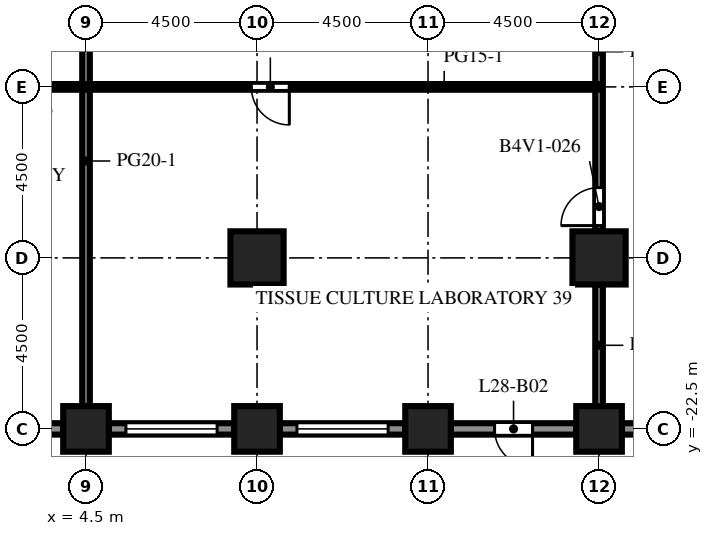
"""IFC4 building model, lengths in metres.
Left out: names, types, materials, properties, quantities, classifications, styles, units other than length and angle.
Written with IfcOpenShell. Run it as: python <this file> out.ifc"""

import sys

from ifc_helpers import new_model, si_unit, direction, frame, frame_2d, origin, origin_2d, place, context, subcontext, project, spatial, rectangle, extrude, element, fill, save


model = new_model("IFC4")
c1 = context("Model", 3, precision=1e-05, world=origin(), true_north=direction((0.0, 1.0)))
c2 = subcontext(c1, "Body", "Model", "MODEL_VIEW")
j1 = project(units=[si_unit("LENGTHUNIT", "METRE"), si_unit("PLANEANGLEUNIT", "RADIAN")], contexts=[c1])
p1 = place(None, origin())
s1 = spatial("IfcSite", under=j1, at=p1, CompositionType="ELEMENT")
p2 = place(p1, origin())
s2 = spatial("IfcBuilding", under=s1, at=p2, CompositionType="ELEMENT")
p3 = place(p2, frame((0.0, 0.0, 124.9)))
s3 = spatial("IfcBuildingStorey", under=s2, at=p3, CompositionType="ELEMENT", Elevation=124.9)
for number, where, z_axis, x_axis in (
    (1, (4.5, -22.5, 0.0), (0.0, 0.0, 1.0), (1.0, 0.0, 0.0)),
    (2, (9.0, -22.5, 0.0), (0.0, 0.0, 1.0), (1.0, 0.0, 0.0)),
    (3, (13.5, -22.5, 0.0), (0.0, 0.0, 1.0), (1.0, 0.0, 0.0)),
    (4, (18.0, -22.5, 0.0), (0.0, 0.0, 1.0), (1.0, 0.0, 0.0)),
):
    element("IfcColumn", number, at=place(p3, frame(where, z_axis=z_axis, x_axis=x_axis)), inside=s3, PredefinedType="COLUMN", context=c2, shape_type="SweptSolid", body=[
        extrude(rectangle(XDim=1.2, YDim=1.2, at=origin_2d()), origin(), (0.0, 0.0, 1.0), 4.1),
    ])
for number, where, z_axis, x_axis in (
    (5, (9.0, -18.0, 0.0), (0.0, 0.0, 1.0), (1.0, 0.0, 0.0)),
    (6, (18.0, -18.0, 0.0), (0.0, 0.0, 1.0), (1.0, 0.0, 0.0)),
):
    element("IfcColumn", number, at=place(p3, frame(where, z_axis=z_axis, x_axis=x_axis)), inside=s3, PredefinedType="COLUMN", context=c2, shape_type="SweptSolid", body=[
        extrude(rectangle(XDim=1.4, YDim=1.4, at=origin_2d()), origin(), (0.0, 0.0, 1.0), 4.1),
    ])
p4 = place(p3, frame((3.9, -22.5, 0.0), z_axis=(0.0, 0.0, 1.0), x_axis=(-1.0, 0.0, 0.0)))
e7 = element("IfcWall", 7, at=p4, inside=s3, PredefinedType="SOLIDWALL", context=c2, shape_type="SweptSolid", body=[
    extrude(rectangle(XDim=3.3, YDim=0.3, at=frame_2d((1.65, 0.0))), origin(), (0.0, 0.0, 1.0), 2.75),
])
p5 = place(p4, frame((0.45, 0.0, 0.8)))
e8 = element("IfcOpeningElement", 8, at=p5, cuts=e7, PredefinedType="OPENING", context=c2, shape_type="SweptSolid", body=[
    extrude(rectangle(XDim=2.4, YDim=1.7, at=frame_2d((1.2, 0.85))), frame((0.0, 0.16, 0.0), z_axis=(0.0, -1.0, 0.0), x_axis=(1.0, 0.0, 0.0)), (0.0, 0.0, 1.0), 0.32),
])
p6 = place(p3, frame((8.4, -22.5, 0.0), z_axis=(0.0, 0.0, 1.0), x_axis=(-1.0, 0.0, 0.0)))
e9 = element("IfcWall", 9, at=p6, inside=s3, PredefinedType="SOLIDWALL", context=c2, shape_type="SweptSolid", body=[
    extrude(rectangle(XDim=3.3, YDim=0.3, at=frame_2d((1.65, 0.0))), origin(), (0.0, 0.0, 1.0), 2.75),
])
p7 = place(p6, frame((0.45, 0.0, 0.8)))
e10 = element("IfcOpeningElement", 10, at=p7, cuts=e9, PredefinedType="OPENING", context=c2, shape_type="SweptSolid", body=[
    extrude(rectangle(XDim=2.4, YDim=1.7, at=frame_2d((1.2, 0.85))), frame((0.0, 0.16, 0.0), z_axis=(0.0, -1.0, 0.0), x_axis=(1.0, 0.0, 0.0)), (0.0, 0.0, 1.0), 0.32),
])
p8 = place(p3, frame((12.9, -22.5, 0.0), z_axis=(0.0, 0.0, 1.0), x_axis=(-1.0, 0.0, 0.0)))
e11 = element("IfcWall", 11, at=p8, inside=s3, PredefinedType="SOLIDWALL", context=c2, shape_type="SweptSolid", body=[
    extrude(rectangle(XDim=3.3, YDim=0.3, at=frame_2d((1.65, 0.0))), origin(), (0.0, 0.0, 1.0), 2.75),
])
p9 = place(p8, frame((0.45, 0.0, 0.8)))
e12 = element("IfcOpeningElement", 12, at=p9, cuts=e11, PredefinedType="OPENING", context=c2, shape_type="SweptSolid", body=[
    extrude(rectangle(XDim=2.4, YDim=1.7, at=frame_2d((1.2, 0.85))), frame((0.0, 0.16, 0.0), z_axis=(0.0, -1.0, 0.0), x_axis=(1.0, 0.0, 0.0)), (0.0, 0.0, 1.0), 0.32),
])
p10 = place(p3, frame((17.4, -22.5, 0.0), z_axis=(0.0, 0.0, 1.0), x_axis=(-1.0, 0.0, 0.0)))
e13 = element("IfcWall", 13, at=p10, inside=s3, PredefinedType="SOLIDWALL", context=c2, shape_type="SweptSolid", body=[
    extrude(rectangle(XDim=3.3, YDim=0.3, at=frame_2d((1.65, 0.0))), origin(), (0.0, 0.0, 1.0), 2.75),
])
p11 = place(p10, frame((1.15, 0.0, 0.0)))
e14 = element("IfcOpeningElement", 14, at=p11, cuts=e13, PredefinedType="OPENING", context=c2, shape_type="SweptSolid", body=[
    extrude(rectangle(XDim=1.0, YDim=2.2, at=frame_2d((0.5, 1.1))), frame((0.0, 0.16, 0.0), z_axis=(0.0, -1.0, 0.0), x_axis=(1.0, 0.0, 0.0)), (0.0, 0.0, 1.0), 0.32),
])
p12 = place(p3, frame((21.9, -22.5, 0.0), z_axis=(0.0, 0.0, 1.0), x_axis=(-1.0, 0.0, 0.0)))
e15 = element("IfcWall", 15, at=p12, inside=s3, PredefinedType="SOLIDWALL", context=c2, shape_type="SweptSolid", body=[
    extrude(rectangle(XDim=3.3, YDim=0.3, at=frame_2d((1.65, 0.0))), origin(), (0.0, 0.0, 1.0), 2.75),
])
p13 = place(p12, frame((1.575, 0.0, 0.8)))
e16 = element("IfcOpeningElement", 16, at=p13, cuts=e15, PredefinedType="OPENING", context=c2, shape_type="SweptSolid", body=[
    extrude(rectangle(XDim=1.2, YDim=1.7, at=frame_2d((0.6, 0.85))), frame((0.0, 0.16, 0.0), z_axis=(0.0, -1.0, 0.0), x_axis=(1.0, 0.0, 0.0)), (0.0, 0.0, 1.0), 0.32),
])
p14 = place(p3, frame((4.5, -21.9, 0.0), z_axis=(0.0, 0.0, 1.0), x_axis=(0.0, 1.0, 0.0)))
e17 = element("IfcWall", 17, at=p14, inside=s3, PredefinedType="PARTITIONING", context=c2, shape_type="SweptSolid", body=[
    extrude(rectangle(XDim=12.9, YDim=0.2, at=frame_2d((6.45, 0.0))), origin(), (0.0, 0.0, 1.0), 3.65),
])
p15 = place(p3, frame((18.0, -21.9, 0.0), z_axis=(0.0, 0.0, 1.0), x_axis=(0.0, 1.0, 0.0)))
e18 = element("IfcWall", 18, at=p15, inside=s3, PredefinedType="PARTITIONING", context=c2, shape_type="SweptSolid", body=[
    extrude(rectangle(XDim=3.2, YDim=0.2, at=frame_2d((1.6, 0.0))), origin(), (0.0, 0.0, 1.0), 3.65),
])
p16 = place(p3, frame((18.0, -17.3, 0.0), z_axis=(0.0, 0.0, 1.0), x_axis=(0.0, 1.0, 0.0)))
e19 = element("IfcWall", 19, at=p16, inside=s3, PredefinedType="PARTITIONING", context=c2, shape_type="SweptSolid", body=[
    extrude(rectangle(XDim=8.3, YDim=0.2, at=frame_2d((4.15, 0.0))), origin(), (0.0, 0.0, 1.0), 3.65),
])
p17 = place(p16, frame((0.15, 0.0, 0.0)))
e20 = element("IfcOpeningElement", 20, at=p17, cuts=e19, PredefinedType="OPENING", context=c2, shape_type="SweptSolid", body=[
    extrude(rectangle(XDim=1.0, YDim=2.1, at=frame_2d((0.5, 1.05))), frame((0.0, 0.11, 0.0), z_axis=(0.0, -1.0, 0.0), x_axis=(1.0, 0.0, 0.0)), (0.0, 0.0, 1.0), 0.22),
])
p18 = place(p3, frame((-10.5, -13.5, 0.0), z_axis=(0.0, 0.0, 1.0), x_axis=(1.0, 0.0, 0.0)))
e21 = element("IfcWall", 21, at=p18, inside=s3, PredefinedType="PARTITIONING", context=c2, shape_type="SweptSolid", body=[
    extrude(rectangle(XDim=28.5, YDim=0.15, at=frame_2d((14.25, 0.0))), origin(), (0.0, 0.0, 1.0), 3.65),
])
p19 = place(p18, frame((3.6, 0.0, 0.0)))
e22 = element("IfcOpeningElement", 22, at=p19, cuts=e21, PredefinedType="OPENING", context=c2, shape_type="SweptSolid", body=[
    extrude(rectangle(XDim=1.0, YDim=2.1, at=frame_2d((0.5, 1.05))), frame((0.0, 0.085, 0.0), z_axis=(0.0, -1.0, 0.0), x_axis=(1.0, 0.0, 0.0)), (0.0, 0.0, 1.0), 0.17),
])
p20 = place(p18, frame((12.6, 0.0, 0.0)))
e23 = element("IfcOpeningElement", 23, at=p20, cuts=e21, PredefinedType="OPENING", context=c2, shape_type="SweptSolid", body=[
    extrude(rectangle(XDim=1.0, YDim=2.1, at=frame_2d((0.5, 1.05))), frame((0.0, 0.085, 0.0), z_axis=(0.0, -1.0, 0.0), x_axis=(1.0, 0.0, 0.0)), (0.0, 0.0, 1.0), 0.17),
])
p21 = place(p18, frame((19.35, 0.0, 0.0)))
e24 = element("IfcOpeningElement", 24, at=p21, cuts=e21, PredefinedType="OPENING", context=c2, shape_type="SweptSolid", body=[
    extrude(rectangle(XDim=1.0, YDim=2.1, at=frame_2d((0.5, 1.05))), frame((0.0, 0.085, 0.0), z_axis=(0.0, -1.0, 0.0), x_axis=(1.0, 0.0, 0.0)), (0.0, 0.0, 1.0), 0.17),
])
p22 = place(p7, origin())
e25 = element("IfcWindow", 25, at=p22, inside=s3, PartitioningType="SINGLE_PANEL", PredefinedType="WINDOW", context=c2, shape_type="SweptSolid", body=[
    extrude(rectangle(XDim=2.4, YDim=1.7, at=frame_2d((1.2, 0.85))), frame((0.0, 0.03, 0.0), z_axis=(0.0, -1.0, 0.0), x_axis=(1.0, 0.0, 0.0)), (0.0, 0.0, 1.0), 0.06),
])
fill(e10, e25)
p23 = place(p9, origin())
e26 = element("IfcWindow", 26, at=p23, inside=s3, PartitioningType="SINGLE_PANEL", PredefinedType="WINDOW", context=c2, shape_type="SweptSolid", body=[
    extrude(rectangle(XDim=2.4, YDim=1.7, at=frame_2d((1.2, 0.85))), frame((0.0, 0.03, 0.0), z_axis=(0.0, -1.0, 0.0), x_axis=(1.0, 0.0, 0.0)), (0.0, 0.0, 1.0), 0.06),
])
fill(e12, e26)
p24 = place(p11, origin())
e27 = element("IfcDoor", 27, at=p24, inside=s3, OperationType="SINGLE_SWING_LEFT", PredefinedType="DOOR", context=c2, shape_type="SweptSolid", body=[
    extrude(rectangle(XDim=1.0, YDim=2.2, at=frame_2d((0.5, 1.1))), frame((0.0, 0.025, 0.0), z_axis=(0.0, -1.0, 0.0), x_axis=(1.0, 0.0, 0.0)), (0.0, 0.0, 1.0), 0.05),
])
fill(e14, e27)
p25 = place(p21, origin())
e28 = element("IfcDoor", 28, at=p25, inside=s3, OperationType="SINGLE_SWING_RIGHT", PredefinedType="DOOR", context=c2, shape_type="SweptSolid", body=[
    extrude(rectangle(XDim=1.0, YDim=2.1, at=frame_2d((0.5, 1.05))), frame((0.0, 0.025, 0.0), z_axis=(0.0, -1.0, 0.0), x_axis=(1.0, 0.0, 0.0)), (0.0, 0.0, 1.0), 0.05),
])
fill(e24, e28)
p26 = place(p17, origin())
e29 = element("IfcDoor", 29, at=p26, inside=s3, OperationType="SINGLE_SWING_LEFT", PredefinedType="DOOR", context=c2, shape_type="SweptSolid", body=[
    extrude(rectangle(XDim=1.0, YDim=2.1, at=frame_2d((0.5, 1.05))), frame((0.0, 0.025, 0.0), z_axis=(0.0, -1.0, 0.0), x_axis=(1.0, 0.0, 0.0)), (0.0, 0.0, 1.0), 0.05),
])
fill(e20, e29)
save(model, sys.argv[1])
